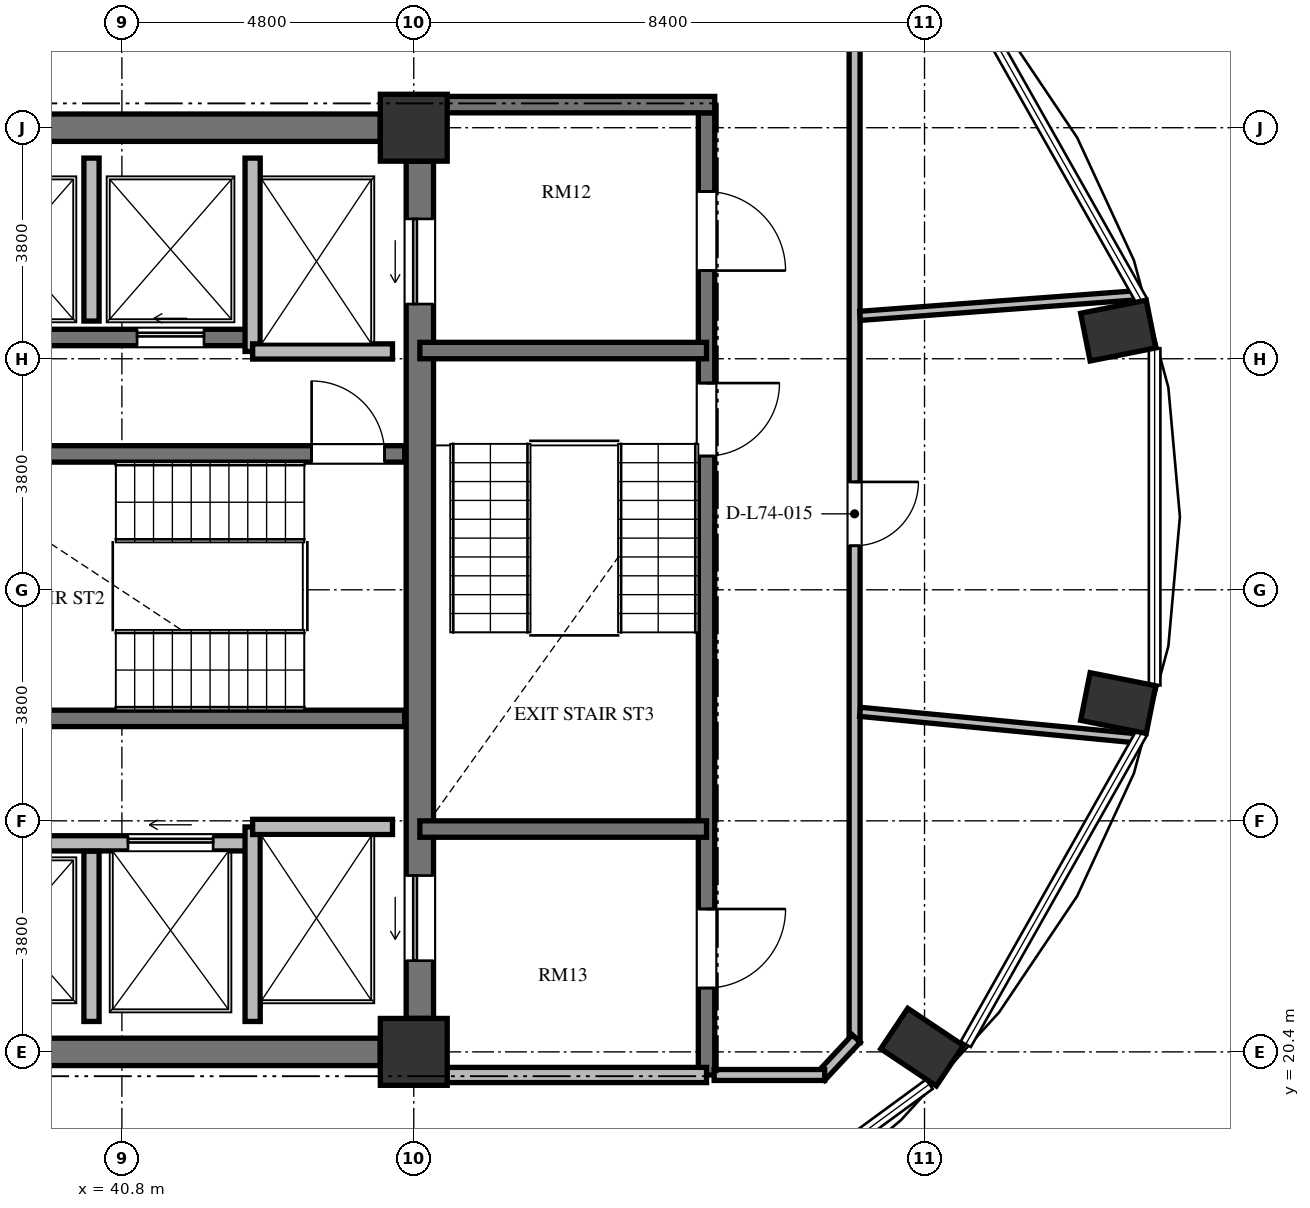
"""IFC4 building model, lengths in metres.
Left out: names, types, materials, properties, quantities, classifications, styles, units other than length and angle.
Written with IfcOpenShell. Run it as: python <this file> out.ifc"""

import sys

from ifc_helpers import new_model, si_unit, direction, frame, frame_2d, origin, origin_2d, place, context, subcontext, project, spatial, rectangle, extrude, element, fill, save


model = new_model("IFC4")
c1 = context("Model", 3, precision=1e-05, world=origin(), true_north=direction((0.0, 1.0)))
c2 = subcontext(c1, "Body", "Model", "MODEL_VIEW")
j1 = project(units=[si_unit("LENGTHUNIT", "METRE"), si_unit("PLANEANGLEUNIT", "RADIAN")], contexts=[c1])
p1 = place(None, origin())
s1 = spatial("IfcSite", under=j1, at=p1, CompositionType="ELEMENT")
p2 = place(p1, origin())
s2 = spatial("IfcBuilding", under=s1, at=p2, CompositionType="ELEMENT")
p3 = place(p2, frame((0.0, 0.0, 284.208)))
s3 = spatial("IfcBuildingStorey", under=s2, at=p3, CompositionType="ELEMENT", Elevation=284.208)
for number, where, z_axis, x_axis in (
    (1, (53.96, 20.478, 0.0), (0.0, 0.0, 1.0), (0.831, -0.556, 0.0)),
    (2, (57.185, 26.137, 0.0), (0.0, 0.0, 1.0), (0.981, -0.195, 0.0)),
    (3, (57.185, 32.263, 0.0), (0.0, 0.0, 1.0), (0.981, 0.195, 0.0)),
):
    element("IfcColumn", number, at=place(p3, frame(where, z_axis=z_axis, x_axis=x_axis)), inside=s3, PredefinedType="COLUMN", context=c2, shape_type="SweptSolid", body=[
        extrude(rectangle(XDim=1.1, YDim=0.8, at=origin_2d()), origin(), (0.0, 0.0, 1.0), 3.648),
    ])
for number, where, z_axis, x_axis in (
    (4, (45.6, 20.4, 0.0), (0.0, 0.0, 1.0), (1.0, 0.0, 0.0)),
    (5, (45.6, 35.6, 0.0), (0.0, 0.0, 1.0), (1.0, 0.0, 0.0)),
):
    element("IfcColumn", number, at=place(p3, frame(where, z_axis=z_axis, x_axis=x_axis)), inside=s3, PredefinedType="COLUMN", context=c2, shape_type="SweptSolid", body=[
        extrude(rectangle(XDim=1.1, YDim=1.1, at=origin_2d()), origin(), (0.0, 0.0, 1.0), 3.648),
    ])
p4 = place(p3, frame((45.7, 20.95, 0.0), z_axis=(0.0, 0.0, 1.0), x_axis=(0.0, 1.0, 0.0)))
e6 = element("IfcWall", 6, at=p4, inside=s3, PredefinedType="SHEAR", context=c2, shape_type="SweptSolid", body=[
    extrude(rectangle(XDim=14.1, YDim=0.45, at=frame_2d((7.05, 0.0))), origin(), (0.0, 0.0, 1.0), 3.648),
])
p5 = place(p4, frame((11.75, 0.0, 0.0)))
e7 = element("IfcOpeningElement", 7, at=p5, cuts=e6, PredefinedType="OPENING", context=c2, shape_type="SweptSolid", body=[
    extrude(rectangle(XDim=1.4, YDim=2.3, at=frame_2d((0.7, 1.15))), frame((0.0, 0.235, 0.0), z_axis=(0.0, -1.0, 0.0), x_axis=(1.0, 0.0, 0.0)), (0.0, 0.0, 1.0), 0.47),
])
p6 = place(p4, frame((0.95, 0.0, 0.0)))
e8 = element("IfcOpeningElement", 8, at=p6, cuts=e6, PredefinedType="OPENING", context=c2, shape_type="SweptSolid", body=[
    extrude(rectangle(XDim=1.4, YDim=2.3, at=frame_2d((0.7, 1.15))), frame((0.0, 0.235, 0.0), z_axis=(0.0, -1.0, 0.0), x_axis=(1.0, 0.0, 0.0)), (0.0, 0.0, 1.0), 0.47),
])
for number, where, z_axis, x_axis in (
    (9, (39.6, 20.4, 0.0), (0.0, 0.0, 1.0), (1.0, 0.0, 0.0)),
    (10, (39.6, 35.6, 0.0), (0.0, 0.0, 1.0), (1.0, 0.0, 0.0)),
):
    element("IfcWall", number, at=place(p3, frame(where, z_axis=z_axis, x_axis=x_axis)), inside=s3, PredefinedType="SHEAR", context=c2, shape_type="SweptSolid", body=[
        extrude(rectangle(XDim=5.45, YDim=0.45, at=frame_2d((2.725, 0.0))), origin(), (0.0, 0.0, 1.0), 3.648),
    ])
p7 = place(p3, frame((37.465, 30.235, 0.0), z_axis=(0.0, 0.0, 1.0), x_axis=(1.0, 0.0, 0.0)))
e11 = element("IfcWall", 11, at=p7, inside=s3, PredefinedType="SHEAR", context=c2, shape_type="SweptSolid", body=[
    extrude(rectangle(XDim=7.985, YDim=0.27, at=frame_2d((3.992, 0.0))), origin(), (0.0, 0.0, 1.0), 3.648),
])
p8 = place(p7, frame((6.455, 0.0, 0.0)))
e12 = element("IfcOpeningElement", 12, at=p8, cuts=e11, PredefinedType="OPENING", context=c2, shape_type="SweptSolid", body=[
    extrude(rectangle(XDim=1.2, YDim=2.15, at=frame_2d((0.6, 1.075))), frame((0.0, 0.145, 0.0), z_axis=(0.0, -1.0, 0.0), x_axis=(1.0, 0.0, 0.0)), (0.0, 0.0, 1.0), 0.29),
])
p9 = place(p3, frame((37.465, 25.885, 0.0), z_axis=(0.0, 0.0, 1.0), x_axis=(1.0, 0.0, 0.0)))
e13 = element("IfcWall", 13, at=p9, inside=s3, PredefinedType="SHEAR", context=c2, shape_type="SweptSolid", body=[
    extrude(rectangle(XDim=7.985, YDim=0.27, at=frame_2d((3.992, 0.0))), origin(), (0.0, 0.0, 1.0), 3.648),
])
p10 = place(p3, frame((26.55, 32.15, 0.0), z_axis=(0.0, 0.0, 1.0), x_axis=(1.0, 0.0, 0.0)))
e14 = element("IfcWall", 14, at=p10, inside=s3, PredefinedType="SHEAR", context=c2, shape_type="SweptSolid", body=[
    extrude(rectangle(XDim=16.4, YDim=0.27, at=frame_2d((8.2, 0.0))), origin(), (0.0, 0.0, 1.0), 3.648),
])
p11 = place(p10, frame((1.375, 0.0, 0.0)))
e15 = element("IfcOpeningElement", 15, at=p11, cuts=e14, PredefinedType="OPENING", context=c2, shape_type="SweptSolid", body=[
    extrude(rectangle(XDim=1.05, YDim=2.15, at=frame_2d((0.525, 1.075))), frame((0.0, 0.145, 0.0), z_axis=(0.0, -1.0, 0.0), x_axis=(1.0, 0.0, 0.0)), (0.0, 0.0, 1.0), 0.29),
])
p12 = place(p10, frame((4.975, 0.0, 0.0)))
e16 = element("IfcOpeningElement", 16, at=p12, cuts=e14, PredefinedType="OPENING", context=c2, shape_type="SweptSolid", body=[
    extrude(rectangle(XDim=1.05, YDim=2.15, at=frame_2d((0.525, 1.075))), frame((0.0, 0.145, 0.0), z_axis=(0.0, -1.0, 0.0), x_axis=(1.0, 0.0, 0.0)), (0.0, 0.0, 1.0), 0.29),
])
p13 = place(p10, frame((8.625, 0.0, 0.0)))
e17 = element("IfcOpeningElement", 17, at=p13, cuts=e14, PredefinedType="OPENING", context=c2, shape_type="SweptSolid", body=[
    extrude(rectangle(XDim=1.05, YDim=2.15, at=frame_2d((0.525, 1.075))), frame((0.0, 0.145, 0.0), z_axis=(0.0, -1.0, 0.0), x_axis=(1.0, 0.0, 0.0)), (0.0, 0.0, 1.0), 0.29),
])
p14 = place(p10, frame((11.9, 0.0, 0.0)))
e18 = element("IfcOpeningElement", 18, at=p14, cuts=e14, PredefinedType="OPENING", context=c2, shape_type="SweptSolid", body=[
    extrude(rectangle(XDim=1.1, YDim=2.2, at=frame_2d((0.55, 1.1))), frame((0.0, 0.145, 0.0), z_axis=(0.0, -1.0, 0.0), x_axis=(1.0, 0.0, 0.0)), (0.0, 0.0, 1.0), 0.29),
])
p15 = place(p10, frame((14.5, 0.0, 0.0)))
e19 = element("IfcOpeningElement", 19, at=p15, cuts=e14, PredefinedType="OPENING", context=c2, shape_type="SweptSolid", body=[
    extrude(rectangle(XDim=1.1, YDim=2.2, at=frame_2d((0.55, 1.1))), frame((0.0, 0.145, 0.0), z_axis=(0.0, -1.0, 0.0), x_axis=(1.0, 0.0, 0.0)), (0.0, 0.0, 1.0), 0.29),
])
p16 = place(p3, frame((26.75, 23.83, 0.0), z_axis=(0.0, 0.0, 1.0), x_axis=(1.0, 0.0, 0.0)))
e20 = element("IfcWall", 20, at=p16, inside=s3, PredefinedType="SOLIDWALL", context=c2, shape_type="SweptSolid", body=[
    extrude(rectangle(XDim=16.2, YDim=0.25, at=frame_2d((8.1, 0.0))), origin(), (0.0, 0.0, 1.0), 3.448),
])
p17 = place(p16, frame((2.025, 0.0, 0.0)))
e21 = element("IfcOpeningElement", 21, at=p17, cuts=e20, PredefinedType="OPENING", context=c2, shape_type="SweptSolid", body=[
    extrude(rectangle(XDim=1.05, YDim=2.15, at=frame_2d((0.525, 1.075))), frame((0.0, 0.135, 0.0), z_axis=(0.0, -1.0, 0.0), x_axis=(1.0, 0.0, 0.0)), (0.0, 0.0, 1.0), 0.27),
])
p18 = place(p16, frame((7.25, 0.0, 0.0)))
e22 = element("IfcOpeningElement", 22, at=p18, cuts=e20, PredefinedType="OPENING", context=c2, shape_type="SweptSolid", body=[
    extrude(rectangle(XDim=1.4, YDim=2.2, at=frame_2d((0.7, 1.1))), frame((0.0, 0.135, 0.0), z_axis=(0.0, -1.0, 0.0), x_axis=(1.0, 0.0, 0.0)), (0.0, 0.0, 1.0), 0.27),
])
p19 = place(p16, frame((11.7, 0.0, 0.0)))
e23 = element("IfcOpeningElement", 23, at=p19, cuts=e20, PredefinedType="OPENING", context=c2, shape_type="SweptSolid", body=[
    extrude(rectangle(XDim=1.1, YDim=2.2, at=frame_2d((0.55, 1.1))), frame((0.0, 0.135, 0.0), z_axis=(0.0, -1.0, 0.0), x_axis=(1.0, 0.0, 0.0)), (0.0, 0.0, 1.0), 0.27),
])
p20 = place(p16, frame((14.15, 0.0, 0.0)))
e24 = element("IfcOpeningElement", 24, at=p20, cuts=e20, PredefinedType="OPENING", context=c2, shape_type="SweptSolid", body=[
    extrude(rectangle(XDim=1.4, YDim=2.3, at=frame_2d((0.7, 1.15))), frame((0.0, 0.135, 0.0), z_axis=(0.0, -1.0, 0.0), x_axis=(1.0, 0.0, 0.0)), (0.0, 0.0, 1.0), 0.27),
])
p21 = place(p3, frame((42.95, 31.92, 0.0), z_axis=(0.0, 0.0, 1.0), x_axis=(0.0, 1.0, 0.0)))
e25 = element("IfcWall", 25, at=p21, inside=s3, PredefinedType="SOLIDWALL", context=c2, shape_type="SweptSolid", body=[
    extrude(rectangle(XDim=3.18, YDim=0.25, at=frame_2d((1.59, 0.0))), origin(), (0.0, 0.0, 1.0), 3.448),
])
p22 = place(p3, frame((42.95, 31.92, 0.0), z_axis=(0.0, 0.0, 1.0), x_axis=(1.0, 0.0, 0.0)))
e26 = element("IfcWall", 26, at=p22, inside=s3, PredefinedType="SOLIDWALL", context=c2, shape_type="SweptSolid", body=[
    extrude(rectangle(XDim=2.3, YDim=0.25, at=frame_2d((1.15, 0.0))), origin(), (0.0, 0.0, 1.0), 3.448),
])
p23 = place(p3, frame((42.95, 20.9, 0.0), z_axis=(0.0, 0.0, 1.0), x_axis=(0.0, 1.0, 0.0)))
e27 = element("IfcWall", 27, at=p23, inside=s3, PredefinedType="SOLIDWALL", context=c2, shape_type="SweptSolid", body=[
    extrude(rectangle(XDim=3.2, YDim=0.25, at=frame_2d((1.6, 0.0))), origin(), (0.0, 0.0, 1.0), 3.448),
])
p24 = place(p3, frame((42.95, 24.1, 0.0), z_axis=(0.0, 0.0, 1.0), x_axis=(1.0, 0.0, 0.0)))
e28 = element("IfcWall", 28, at=p24, inside=s3, PredefinedType="SOLIDWALL", context=c2, shape_type="SweptSolid", body=[
    extrude(rectangle(XDim=2.3, YDim=0.25, at=frame_2d((1.15, 0.0))), origin(), (0.0, 0.0, 1.0), 3.448),
])
p25 = place(p3, frame((40.3, 32.42, 0.0), z_axis=(0.0, 0.0, 1.0), x_axis=(0.0, 1.0, 0.0)))
e29 = element("IfcWall", 29, at=p25, inside=s3, PredefinedType="SOLIDWALL", context=c2, shape_type="SweptSolid", body=[
    extrude(rectangle(XDim=2.68, YDim=0.25, at=frame_2d((1.34, 0.0))), origin(), (0.0, 0.0, 1.0), 3.448),
])
p26 = place(p3, frame((40.3, 20.9, 0.0), z_axis=(0.0, 0.0, 1.0), x_axis=(0.0, 1.0, 0.0)))
e30 = element("IfcWall", 30, at=p26, inside=s3, PredefinedType="SOLIDWALL", context=c2, shape_type="SweptSolid", body=[
    extrude(rectangle(XDim=2.8, YDim=0.25, at=frame_2d((1.4, 0.0))), origin(), (0.0, 0.0, 1.0), 3.448),
])
p27 = place(p3, frame((50.415, 35.845, 0.0), z_axis=(0.0, 0.0, 1.0), x_axis=(0.0, -1.0, 0.0)))
e31 = element("IfcWall", 31, at=p27, inside=s3, PredefinedType="SHEAR", context=c2, shape_type="SweptSolid", body=[
    extrude(rectangle(XDim=15.825, YDim=0.27, at=frame_2d((7.913, 0.0))), origin(), (0.0, 0.0, 1.0), 3.648),
])
p28 = place(p27, frame((4.445, 0.0, 0.0)))
e32 = element("IfcOpeningElement", 32, at=p28, cuts=e31, PredefinedType="OPENING", context=c2, shape_type="SweptSolid", body=[
    extrude(rectangle(XDim=1.2, YDim=2.15, at=frame_2d((0.6, 1.075))), frame((0.0, 0.145, 0.0), z_axis=(0.0, -1.0, 0.0), x_axis=(1.0, 0.0, 0.0)), (0.0, 0.0, 1.0), 0.29),
])
p29 = place(p27, frame((1.295, 0.0, 0.0)))
e33 = element("IfcOpeningElement", 33, at=p29, cuts=e31, PredefinedType="OPENING", context=c2, shape_type="SweptSolid", body=[
    extrude(rectangle(XDim=1.3, YDim=2.2, at=frame_2d((0.65, 1.1))), frame((0.0, 0.145, 0.0), z_axis=(0.0, -1.0, 0.0), x_axis=(1.0, 0.0, 0.0)), (0.0, 0.0, 1.0), 0.29),
])
p30 = place(p27, frame((13.095, 0.0, 0.0)))
e34 = element("IfcOpeningElement", 34, at=p30, cuts=e31, PredefinedType="OPENING", context=c2, shape_type="SweptSolid", body=[
    extrude(rectangle(XDim=1.3, YDim=2.2, at=frame_2d((0.65, 1.1))), frame((0.0, 0.145, 0.0), z_axis=(0.0, -1.0, 0.0), x_axis=(1.0, 0.0, 0.0)), (0.0, 0.0, 1.0), 0.29),
])
p31 = place(p3, frame((45.925, 35.98, 0.0), z_axis=(0.0, 0.0, 1.0), x_axis=(1.0, 0.0, 0.0)))
e35 = element("IfcWall", 35, at=p31, inside=s3, PredefinedType="SHEAR", context=c2, shape_type="SweptSolid", body=[
    extrude(rectangle(XDim=4.625, YDim=0.27, at=frame_2d((2.312, 0.0))), origin(), (0.0, 0.0, 1.0), 3.648),
])
for number, where, z_axis, x_axis in (
    (36, (45.7, 31.935, 0.0), (0.0, 0.0, 1.0), (1.0, 0.0, 0.0)),
    (37, (45.7, 24.065, 0.0), (0.0, 0.0, 1.0), (1.0, 0.0, 0.0)),
):
    element("IfcWall", number, at=place(p3, frame(where, z_axis=z_axis, x_axis=x_axis)), inside=s3, PredefinedType="SHEAR", context=c2, shape_type="SweptSolid", body=[
        extrude(rectangle(XDim=4.715, YDim=0.27, at=frame_2d((2.357, 0.0))), origin(), (0.0, 0.0, 1.0), 3.648),
    ])
p32 = place(p3, frame((45.7, 20.02, 0.0), z_axis=(0.0, 0.0, 1.0), x_axis=(1.0, 0.0, 0.0)))
e38 = element("IfcWall", 38, at=p32, inside=s3, PredefinedType="SOLIDWALL", context=c2, shape_type="SweptSolid", body=[
    extrude(rectangle(XDim=4.715, YDim=0.25, at=frame_2d((2.357, 0.0))), origin(), (0.0, 0.0, 1.0), 3.448),
])
p33 = place(p3, frame((52.85, 37.85, 0.0), z_axis=(0.0, 0.0, 1.0), x_axis=(0.0, -1.0, 0.0)))
e39 = element("IfcWall", 39, at=p33, inside=s3, PredefinedType="PARTITIONING", context=c2, shape_type="SweptSolid", body=[
    extrude(rectangle(XDim=17.3, YDim=0.18, at=frame_2d((8.65, 0.0))), origin(), (0.0, 0.0, 1.0), 3.448),
])
p34 = place(p33, frame((8.076, 0.0, 0.0)))
e40 = element("IfcOpeningElement", 40, at=p34, cuts=e39, PredefinedType="OPENING", context=c2, shape_type="SweptSolid", body=[
    extrude(rectangle(XDim=1.05, YDim=2.15, at=frame_2d((0.525, 1.075))), frame((0.0, 0.1, 0.0), z_axis=(0.0, -1.0, 0.0), x_axis=(1.0, 0.0, 0.0)), (0.0, 0.0, 1.0), 0.2),
])
p35 = place(p3, frame((52.877, 20.619, 0.0), z_axis=(0.0, 0.0, 1.0), x_axis=(-0.682409308253, -0.730970270264, 0.0)))
e41 = element("IfcWall", 41, at=p35, inside=s3, PredefinedType="PARTITIONING", context=c2, shape_type="SweptSolid", body=[
    extrude(rectangle(XDim=0.86, YDim=0.18, at=frame_2d((0.43, 0.0))), origin(), (0.0, 0.0, 1.0), 3.448),
])
p36 = place(p3, frame((52.358, 20.02, 0.0), z_axis=(0.0, 0.0, 1.0), x_axis=(-1.0, 0.0, 0.0)))
e42 = element("IfcWall", 42, at=p36, inside=s3, PredefinedType="PARTITIONING", context=c2, shape_type="SweptSolid", body=[
    extrude(rectangle(XDim=1.818, YDim=0.18, at=frame_2d((0.909, 0.0))), origin(), (0.0, 0.0, 1.0), 3.448),
])
p37 = place(p3, frame((52.94, 25.993, 0.0), z_axis=(0.0, 0.0, 1.0), x_axis=(0.995435221006, -0.095439618505, 0.0)))
e43 = element("IfcWall", 43, at=p37, inside=s3, PredefinedType="PARTITIONING", context=c2, shape_type="SweptSolid", body=[
    extrude(rectangle(XDim=4.604, YDim=0.15, at=frame_2d((2.302, 0.0))), origin(), (0.0, 0.0, 1.0), 3.448),
])
p38 = place(p3, frame((52.94, 32.506, 0.0), z_axis=(0.0, 0.0, 1.0), x_axis=(0.997246844083, 0.074153435301, 0.0)))
e44 = element("IfcWall", 44, at=p38, inside=s3, PredefinedType="PARTITIONING", context=c2, shape_type="SweptSolid", body=[
    extrude(rectangle(XDim=4.596, YDim=0.15, at=frame_2d((2.298, 0.0))), origin(), (0.0, 0.0, 1.0), 3.448),
])
p39 = place(p8, origin())
e45 = element("IfcDoor", 45, at=p39, inside=s3, OperationType="SINGLE_SWING_LEFT", PredefinedType="DOOR", context=c2, shape_type="SweptSolid", body=[
    extrude(rectangle(XDim=1.2, YDim=2.15, at=frame_2d((0.6, 1.075))), frame((0.0, 0.025, 0.0), z_axis=(0.0, -1.0, 0.0), x_axis=(1.0, 0.0, 0.0)), (0.0, 0.0, 1.0), 0.05),
])
fill(e12, e45)
p40 = place(p15, origin())
e46 = element("IfcDoor", 46, at=p40, inside=s3, OperationType="SLIDING_TO_LEFT", PredefinedType="DOOR", context=c2, shape_type="SweptSolid", body=[
    extrude(rectangle(XDim=1.1, YDim=2.2, at=frame_2d((0.55, 1.1))), frame((0.0, 0.025, 0.0), z_axis=(0.0, -1.0, 0.0), x_axis=(1.0, 0.0, 0.0)), (0.0, 0.0, 1.0), 0.05),
])
fill(e19, e46)
p41 = place(p5, origin())
e47 = element("IfcDoor", 47, at=p41, inside=s3, OperationType="SLIDING_TO_LEFT", PredefinedType="DOOR", context=c2, shape_type="SweptSolid", body=[
    extrude(rectangle(XDim=1.4, YDim=2.3, at=frame_2d((0.7, 1.15))), frame((0.0, 0.025, 0.0), z_axis=(0.0, -1.0, 0.0), x_axis=(1.0, 0.0, 0.0)), (0.0, 0.0, 1.0), 0.05),
])
fill(e7, e47)
p42 = place(p6, origin())
e48 = element("IfcDoor", 48, at=p42, inside=s3, OperationType="SLIDING_TO_LEFT", PredefinedType="DOOR", context=c2, shape_type="SweptSolid", body=[
    extrude(rectangle(XDim=1.4, YDim=2.3, at=frame_2d((0.7, 1.15))), frame((0.0, 0.025, 0.0), z_axis=(0.0, -1.0, 0.0), x_axis=(1.0, 0.0, 0.0)), (0.0, 0.0, 1.0), 0.05),
])
fill(e8, e48)
p43 = place(p20, origin())
e49 = element("IfcDoor", 49, at=p43, inside=s3, OperationType="SLIDING_TO_LEFT", PredefinedType="DOOR", context=c2, shape_type="SweptSolid", body=[
    extrude(rectangle(XDim=1.4, YDim=2.3, at=frame_2d((0.7, 1.15))), frame((0.0, 0.025, 0.0), z_axis=(0.0, -1.0, 0.0), x_axis=(1.0, 0.0, 0.0)), (0.0, 0.0, 1.0), 0.05),
])
fill(e24, e49)
p44 = place(p28, origin())
e50 = element("IfcDoor", 50, at=p44, inside=s3, OperationType="SINGLE_SWING_LEFT", PredefinedType="DOOR", context=c2, shape_type="SweptSolid", body=[
    extrude(rectangle(XDim=1.2, YDim=2.15, at=frame_2d((0.6, 1.075))), frame((0.0, 0.025, 0.0), z_axis=(0.0, -1.0, 0.0), x_axis=(1.0, 0.0, 0.0)), (0.0, 0.0, 1.0), 0.05),
])
fill(e32, e50)
p45 = place(p29, origin())
e51 = element("IfcDoor", 51, at=p45, inside=s3, OperationType="SINGLE_SWING_RIGHT", PredefinedType="DOOR", context=c2, shape_type="SweptSolid", body=[
    extrude(rectangle(XDim=1.3, YDim=2.2, at=frame_2d((0.65, 1.1))), frame((0.0, 0.025, 0.0), z_axis=(0.0, -1.0, 0.0), x_axis=(1.0, 0.0, 0.0)), (0.0, 0.0, 1.0), 0.05),
])
fill(e33, e51)
p46 = place(p30, origin())
e52 = element("IfcDoor", 52, at=p46, inside=s3, OperationType="SINGLE_SWING_LEFT", PredefinedType="DOOR", context=c2, shape_type="SweptSolid", body=[
    extrude(rectangle(XDim=1.3, YDim=2.2, at=frame_2d((0.65, 1.1))), frame((0.0, 0.025, 0.0), z_axis=(0.0, -1.0, 0.0), x_axis=(1.0, 0.0, 0.0)), (0.0, 0.0, 1.0), 0.05),
])
fill(e34, e52)
p47 = place(p34, origin())
e53 = element("IfcDoor", 53, at=p47, inside=s3, OperationType="SINGLE_SWING_LEFT", PredefinedType="DOOR", context=c2, shape_type="SweptSolid", body=[
    extrude(rectangle(XDim=1.05, YDim=2.15, at=frame_2d((0.525, 1.075))), frame((0.0, 0.025, 0.0), z_axis=(0.0, -1.0, 0.0), x_axis=(1.0, 0.0, 0.0)), (0.0, 0.0, 1.0), 0.05),
])
fill(e40, e53)
save(model, sys.argv[1])
